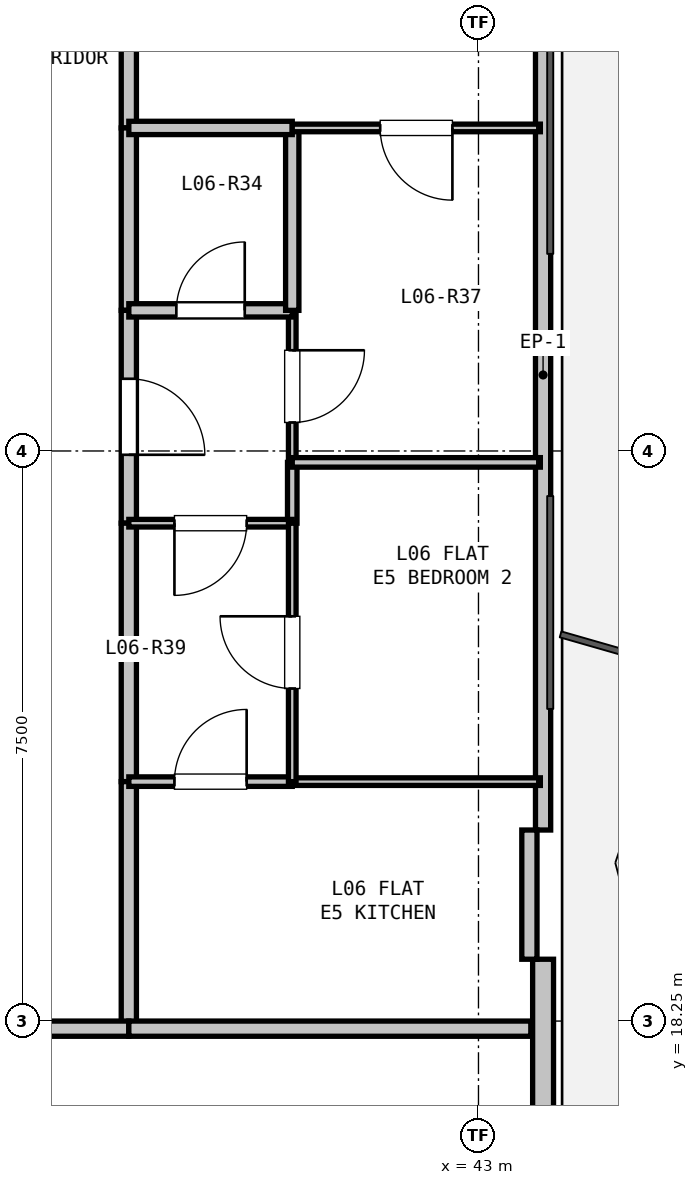
"""IFC4 building model, lengths in metres.
Left out: names, types, materials, properties, quantities, classifications, styles, units other than length and angle.
Written with IfcOpenShell. Run it as: python <this file> out.ifc"""

import sys

from ifc_helpers import new_model, si_unit, direction, frame, frame_2d, origin, place, context, subcontext, project, spatial, rectangle, extrude, element, fill, save


model = new_model("IFC4")
c1 = context("Model", 3, precision=1e-05, world=origin(), true_north=direction((0.0, 1.0)))
c2 = subcontext(c1, "Body", "Model", "MODEL_VIEW")
j1 = project(units=[si_unit("LENGTHUNIT", "METRE"), si_unit("PLANEANGLEUNIT", "RADIAN")], contexts=[c1])
p1 = place(None, origin())
s1 = spatial("IfcSite", under=j1, at=p1, CompositionType="ELEMENT")
p2 = place(p1, origin())
s2 = spatial("IfcBuilding", under=s1, at=p2, CompositionType="ELEMENT")
p3 = place(p2, frame((0.0, 0.0, 25.8)))
s3 = spatial("IfcBuildingStorey", under=s2, at=p3, CompositionType="ELEMENT", Elevation=25.8)
p4 = place(p3, frame((43.85, 32.737, 0.0), z_axis=(0.0, 0.0, 1.0), x_axis=(0.0, -1.0, 0.0)))
e1 = element("IfcWall", 1, at=p4, inside=s3, PredefinedType="PARAPET", context=c2, shape_type="SweptSolid", body=[
    extrude(rectangle(XDim=11.973, YDim=0.2, at=frame_2d((5.987, 0.0))), origin(), (0.0, 0.0, 1.0), 0.2),
])
p5 = place(p3, frame((43.85, 19.063, 0.0), z_axis=(0.0, 0.0, 1.0), x_axis=(0.0, -1.0, 0.0)))
e2 = element("IfcWall", 2, at=p5, inside=s3, PredefinedType="SOLIDWALL", context=c2, shape_type="SweptSolid", body=[
    extrude(rectangle(XDim=12.673, YDim=0.275, at=frame_2d((6.336, 0.0))), origin(), (0.0, 0.0, 1.0), 2.66),
])
p6 = place(p3, frame((43.67, 20.763, 0.0), z_axis=(0.0, 0.0, 1.0), x_axis=(0.0, -1.0, 0.0)))
e3 = element("IfcWall", 3, at=p6, inside=s3, PredefinedType="PARAPET", context=c2, shape_type="SweptSolid", body=[
    extrude(rectangle(XDim=1.7, YDim=0.2, at=frame_2d((0.85, 0.0))), origin(), (0.0, 0.0, 1.0), 2.66),
])
p7 = place(p3, frame((38.4, 35.35, 0.0), z_axis=(0.0, 0.0, 1.0), x_axis=(0.0, -1.0, 0.0)))
e4 = element("IfcWall", 4, at=p7, inside=s3, PredefinedType="PARTITIONING", context=c2, shape_type="SweptSolid", body=[
    extrude(rectangle(XDim=5.35, YDim=0.2, at=frame_2d((2.675, 0.0))), origin(), (0.0, 0.0, 1.0), 2.337),
])
p8 = place(p3, frame((38.4, 30.0, 0.0), z_axis=(0.0, 0.0, 1.0), x_axis=(0.0, -1.0, 0.0)))
e5 = element("IfcWall", 5, at=p8, inside=s3, PredefinedType="PARTITIONING", context=c2, shape_type="SweptSolid", body=[
    extrude(rectangle(XDim=2.4, YDim=0.2, at=frame_2d((1.2, 0.0))), origin(), (0.0, 0.0, 1.0), 3.04),
])
p9 = place(p3, frame((38.4, 27.6, 0.0), z_axis=(0.0, 0.0, 1.0), x_axis=(0.0, -1.0, 0.0)))
e6 = element("IfcWall", 6, at=p9, inside=s3, PredefinedType="PARTITIONING", context=c2, shape_type="SweptSolid", body=[
    extrude(rectangle(XDim=2.8, YDim=0.2, at=frame_2d((1.4, 0.0))), origin(), (0.0, 0.0, 1.0), 3.04),
])
p10 = place(p9, frame((0.9, 0.0, 0.0)))
e7 = element("IfcOpeningElement", 7, at=p10, cuts=e6, PredefinedType="OPENING", context=c2, shape_type="SweptSolid", body=[
    extrude(rectangle(XDim=1.0, YDim=2.15, at=frame_2d((0.5, 1.075))), frame((0.0, 0.11, 0.0), z_axis=(0.0, -1.0, 0.0), x_axis=(1.0, 0.0, 0.0)), (0.0, 0.0, 1.0), 0.22),
])
p11 = place(p3, frame((38.4, 24.8, 0.0), z_axis=(0.0, 0.0, 1.0), x_axis=(0.0, -1.0, 0.0)))
e8 = element("IfcWall", 8, at=p11, inside=s3, PredefinedType="PARTITIONING", context=c2, shape_type="SweptSolid", body=[
    extrude(rectangle(XDim=3.4, YDim=0.2, at=frame_2d((1.7, 0.0))), origin(), (0.0, 0.0, 1.0), 3.04),
])
p12 = place(p3, frame((38.4, 21.4, 0.0), z_axis=(0.0, 0.0, 1.0), x_axis=(0.0, -1.0, 0.0)))
e9 = element("IfcWall", 9, at=p12, inside=s3, PredefinedType="PARTITIONING", context=c2, shape_type="SweptSolid", body=[
    extrude(rectangle(XDim=3.25, YDim=0.2, at=frame_2d((1.625, 0.0))), origin(), (0.0, 0.0, 1.0), 3.04),
])
p13 = place(p3, frame((38.4, 18.15, 0.0), z_axis=(0.0, 0.0, 1.0), x_axis=(-1.0, 0.0, 0.0)))
e10 = element("IfcWall", 10, at=p13, inside=s3, PredefinedType="PARTITIONING", context=c2, shape_type="SweptSolid", body=[
    extrude(rectangle(XDim=2.6, YDim=0.2, at=frame_2d((1.3, 0.0))), origin(), (0.0, 0.0, 1.0), 2.337),
])
p14 = place(p3, frame((40.55, 27.6, 0.0), z_axis=(0.0, 0.0, 1.0), x_axis=(0.0, -1.0, 0.0)))
e11 = element("IfcWall", 11, at=p14, inside=s3, PredefinedType="PARTITIONING", context=c2, shape_type="SweptSolid", body=[
    extrude(rectangle(XDim=2.0, YDim=0.1, at=frame_2d((1.0, 0.0))), origin(), (0.0, 0.0, 1.0), 3.04),
])
p15 = place(p14, frame((0.525, 0.0, 0.0)))
e12 = element("IfcOpeningElement", 12, at=p15, cuts=e11, PredefinedType="OPENING", context=c2, shape_type="SweptSolid", body=[
    extrude(rectangle(XDim=0.95, YDim=2.1, at=frame_2d((0.475, 1.05))), frame((0.0, 0.06, 0.0), z_axis=(0.0, -1.0, 0.0), x_axis=(1.0, 0.0, 0.0)), (0.0, 0.0, 1.0), 0.12),
])
p16 = place(p3, frame((40.55, 25.6, 0.0), z_axis=(0.0, 0.0, 1.0), x_axis=(0.0, -1.0, 0.0)))
e13 = element("IfcWall", 13, at=p16, inside=s3, PredefinedType="PARTITIONING", context=c2, shape_type="SweptSolid", body=[
    extrude(rectangle(XDim=0.8, YDim=0.125, at=frame_2d((0.4, 0.0))), origin(), (0.0, 0.0, 1.0), 3.04),
])
p17 = place(p3, frame((40.55, 24.8, 0.0), z_axis=(0.0, 0.0, 1.0), x_axis=(-1.0, 0.0, 0.0)))
e14 = element("IfcWall", 14, at=p17, inside=s3, PredefinedType="PARTITIONING", context=c2, shape_type="SweptSolid", body=[
    extrude(rectangle(XDim=2.15, YDim=0.1, at=frame_2d((1.075, 0.0))), origin(), (0.0, 0.0, 1.0), 3.04),
])
p18 = place(p17, frame((0.6, 0.0, 0.0)))
e15 = element("IfcOpeningElement", 15, at=p18, cuts=e14, PredefinedType="OPENING", context=c2, shape_type="SweptSolid", body=[
    extrude(rectangle(XDim=0.95, YDim=2.1, at=frame_2d((0.475, 1.05))), frame((0.0, 0.06, 0.0), z_axis=(0.0, -1.0, 0.0), x_axis=(1.0, 0.0, 0.0)), (0.0, 0.0, 1.0), 0.12),
])
p19 = place(p3, frame((38.4, 27.6, 0.0), z_axis=(0.0, 0.0, 1.0), x_axis=(1.0, 0.0, 0.0)))
e16 = element("IfcWall", 16, at=p19, inside=s3, PredefinedType="PLUMBINGWALL", context=c2, shape_type="SweptSolid", body=[
    extrude(rectangle(XDim=2.15, YDim=0.175, at=frame_2d((1.075, 0.0))), origin(), (0.0, 0.0, 1.0), 3.04),
])
p20 = place(p19, frame((0.625, 0.0, 0.0)))
e17 = element("IfcOpeningElement", 17, at=p20, cuts=e16, PredefinedType="OPENING", context=c2, shape_type="SweptSolid", body=[
    extrude(rectangle(XDim=0.9, YDim=2.1, at=frame_2d((0.45, 1.05))), frame((0.0, 0.097, 0.0), z_axis=(0.0, -1.0, 0.0), x_axis=(1.0, 0.0, 0.0)), (0.0, 0.0, 1.0), 0.195),
])
p21 = place(p3, frame((38.4, 18.15, 0.0), z_axis=(0.0, 0.0, 1.0), x_axis=(1.0, 0.0, 0.0)))
e18 = element("IfcWall", 18, at=p21, inside=s3, PredefinedType="PARTITIONING", context=c2, shape_type="SweptSolid", body=[
    extrude(rectangle(XDim=5.289, YDim=0.2, at=frame_2d((2.644, 0.0))), origin(), (0.0, 0.0, 1.0), 2.365),
])
p22 = place(p3, frame((40.55, 30.0, 0.0), z_axis=(0.0, 0.0, 1.0), x_axis=(0.0, -1.0, 0.0)))
e19 = element("IfcWall", 19, at=p22, inside=s3, PredefinedType="PLUMBINGWALL", context=c2, shape_type="SweptSolid", body=[
    extrude(rectangle(XDim=2.4, YDim=0.175, at=frame_2d((1.2, 0.0))), origin(), (0.0, 0.0, 1.0), 3.04),
])
p23 = place(p3, frame((38.4, 30.0, 0.0), z_axis=(0.0, 0.0, 1.0), x_axis=(1.0, 0.0, 0.0)))
e20 = element("IfcWall", 20, at=p23, inside=s3, PredefinedType="PLUMBINGWALL", context=c2, shape_type="SweptSolid", body=[
    extrude(rectangle(XDim=2.15, YDim=0.175, at=frame_2d((1.075, 0.0))), origin(), (0.0, 0.0, 1.0), 3.04),
])
p24 = place(p3, frame((38.4, 21.4, 0.0), z_axis=(0.0, 0.0, 1.0), x_axis=(1.0, 0.0, 0.0)))
e21 = element("IfcWall", 21, at=p24, inside=s3, PredefinedType="PARTITIONING", context=c2, shape_type="SweptSolid", body=[
    extrude(rectangle(XDim=2.15, YDim=0.125, at=frame_2d((1.075, 0.0))), origin(), (0.0, 0.0, 1.0), 3.04),
])
p25 = place(p24, frame((0.6, 0.0, 0.0)))
e22 = element("IfcOpeningElement", 22, at=p25, cuts=e21, PredefinedType="OPENING", context=c2, shape_type="SweptSolid", body=[
    extrude(rectangle(XDim=0.95, YDim=2.1, at=frame_2d((0.475, 1.05))), frame((0.0, 0.073, 0.0), z_axis=(0.0, -1.0, 0.0), x_axis=(1.0, 0.0, 0.0)), (0.0, 0.0, 1.0), 0.145),
])
p26 = place(p3, frame((40.55, 21.4, 0.0), z_axis=(0.0, 0.0, 1.0), x_axis=(1.0, 0.0, 0.0)))
e23 = element("IfcWall", 23, at=p26, inside=s3, PredefinedType="PARTITIONING", context=c2, shape_type="SweptSolid", body=[
    extrude(rectangle(XDim=3.264, YDim=0.1, at=frame_2d((1.632, 0.0))), origin(), (0.0, 0.0, 1.0), 2.365),
])
p27 = place(p3, frame((43.814, 30.0, 0.0), z_axis=(0.0, 0.0, 1.0), x_axis=(-1.0, 0.0, 0.0)))
e24 = element("IfcWall", 24, at=p27, inside=s3, PredefinedType="PARTITIONING", context=c2, shape_type="SweptSolid", body=[
    extrude(rectangle(XDim=3.264, YDim=0.1, at=frame_2d((1.632, 0.0))), origin(), (0.0, 0.0, 1.0), 2.365),
])
p28 = place(p27, frame((1.157, 0.0, 0.0)))
e25 = element("IfcOpeningElement", 25, at=p28, cuts=e24, PredefinedType="OPENING", context=c2, shape_type="SweptSolid", body=[
    extrude(rectangle(XDim=0.95, YDim=2.1, at=frame_2d((0.475, 1.05))), frame((0.0, 0.06, 0.0), z_axis=(0.0, -1.0, 0.0), x_axis=(1.0, 0.0, 0.0)), (0.0, 0.0, 1.0), 0.12),
])
p29 = place(p3, frame((43.814, 25.6, 0.0), z_axis=(0.0, 0.0, 1.0), x_axis=(-1.0, 0.0, 0.0)))
e26 = element("IfcWall", 26, at=p29, inside=s3, PredefinedType="PARTITIONING", context=c2, shape_type="SweptSolid", body=[
    extrude(rectangle(XDim=3.264, YDim=0.125, at=frame_2d((1.632, 0.0))), origin(), (0.0, 0.0, 1.0), 2.365),
])
p30 = place(p3, frame((40.55, 21.4, 0.0), z_axis=(0.0, 0.0, 1.0), x_axis=(0.0, 1.0, 0.0)))
e27 = element("IfcWall", 27, at=p30, inside=s3, PredefinedType="PARTITIONING", context=c2, shape_type="SweptSolid", body=[
    extrude(rectangle(XDim=3.4, YDim=0.1, at=frame_2d((1.7, 0.0))), origin(), (0.0, 0.0, 1.0), 3.04),
])
p31 = place(p30, frame((1.225, 0.0, 0.0)))
e28 = element("IfcOpeningElement", 28, at=p31, cuts=e27, PredefinedType="OPENING", context=c2, shape_type="SweptSolid", body=[
    extrude(rectangle(XDim=0.95, YDim=2.1, at=frame_2d((0.475, 1.05))), frame((0.0, 0.06, 0.0), z_axis=(0.0, -1.0, 0.0), x_axis=(1.0, 0.0, 0.0)), (0.0, 0.0, 1.0), 0.12),
])
p32 = place(p10, origin())
e29 = element("IfcDoor", 29, at=p32, inside=s3, OperationType="SINGLE_SWING_RIGHT", PredefinedType="DOOR", context=c2, shape_type="SweptSolid", body=[
    extrude(rectangle(XDim=1.0, YDim=2.15, at=frame_2d((0.5, 1.075))), frame((0.0, 0.025, 0.0), z_axis=(0.0, -1.0, 0.0), x_axis=(1.0, 0.0, 0.0)), (0.0, 0.0, 1.0), 0.05),
])
fill(e7, e29)
p33 = place(p20, origin())
e30 = element("IfcDoor", 30, at=p33, inside=s3, OperationType="SINGLE_SWING_RIGHT", PredefinedType="DOOR", context=c2, shape_type="SweptSolid", body=[
    extrude(rectangle(XDim=0.9, YDim=2.1, at=frame_2d((0.45, 1.05))), frame((0.0, 0.025, 0.0), z_axis=(0.0, -1.0, 0.0), x_axis=(1.0, 0.0, 0.0)), (0.0, 0.0, 1.0), 0.05),
])
fill(e17, e30)
p34 = place(p15, origin())
e31 = element("IfcDoor", 31, at=p34, inside=s3, OperationType="SINGLE_SWING_LEFT", PredefinedType="DOOR", context=c2, shape_type="SweptSolid", body=[
    extrude(rectangle(XDim=0.95, YDim=2.1, at=frame_2d((0.475, 1.05))), frame((0.0, 0.025, 0.0), z_axis=(0.0, -1.0, 0.0), x_axis=(1.0, 0.0, 0.0)), (0.0, 0.0, 1.0), 0.05),
])
fill(e12, e31)
p35 = place(p18, origin())
e32 = element("IfcDoor", 32, at=p35, inside=s3, OperationType="SINGLE_SWING_RIGHT", PredefinedType="DOOR", context=c2, shape_type="SweptSolid", body=[
    extrude(rectangle(XDim=0.95, YDim=2.1, at=frame_2d((0.475, 1.05))), frame((0.0, 0.025, 0.0), z_axis=(0.0, -1.0, 0.0), x_axis=(1.0, 0.0, 0.0)), (0.0, 0.0, 1.0), 0.05),
])
fill(e15, e32)
p36 = place(p25, origin())
e33 = element("IfcDoor", 33, at=p36, inside=s3, OperationType="SINGLE_SWING_RIGHT", PredefinedType="DOOR", context=c2, shape_type="SweptSolid", body=[
    extrude(rectangle(XDim=0.95, YDim=2.1, at=frame_2d((0.475, 1.05))), frame((0.0, 0.025, 0.0), z_axis=(0.0, -1.0, 0.0), x_axis=(1.0, 0.0, 0.0)), (0.0, 0.0, 1.0), 0.05),
])
fill(e22, e33)
p37 = place(p28, origin())
e34 = element("IfcDoor", 34, at=p37, inside=s3, OperationType="SINGLE_SWING_LEFT", PredefinedType="DOOR", context=c2, shape_type="SweptSolid", body=[
    extrude(rectangle(XDim=0.95, YDim=2.1, at=frame_2d((0.475, 1.05))), frame((0.0, 0.025, 0.0), z_axis=(0.0, -1.0, 0.0), x_axis=(1.0, 0.0, 0.0)), (0.0, 0.0, 1.0), 0.05),
])
fill(e25, e34)
p38 = place(p31, origin())
e35 = element("IfcDoor", 35, at=p38, inside=s3, OperationType="SINGLE_SWING_RIGHT", PredefinedType="DOOR", context=c2, shape_type="SweptSolid", body=[
    extrude(rectangle(XDim=0.95, YDim=2.1, at=frame_2d((0.475, 1.05))), frame((0.0, 0.025, 0.0), z_axis=(0.0, -1.0, 0.0), x_axis=(1.0, 0.0, 0.0)), (0.0, 0.0, 1.0), 0.05),
])
fill(e28, e35)
save(model, sys.argv[1])
